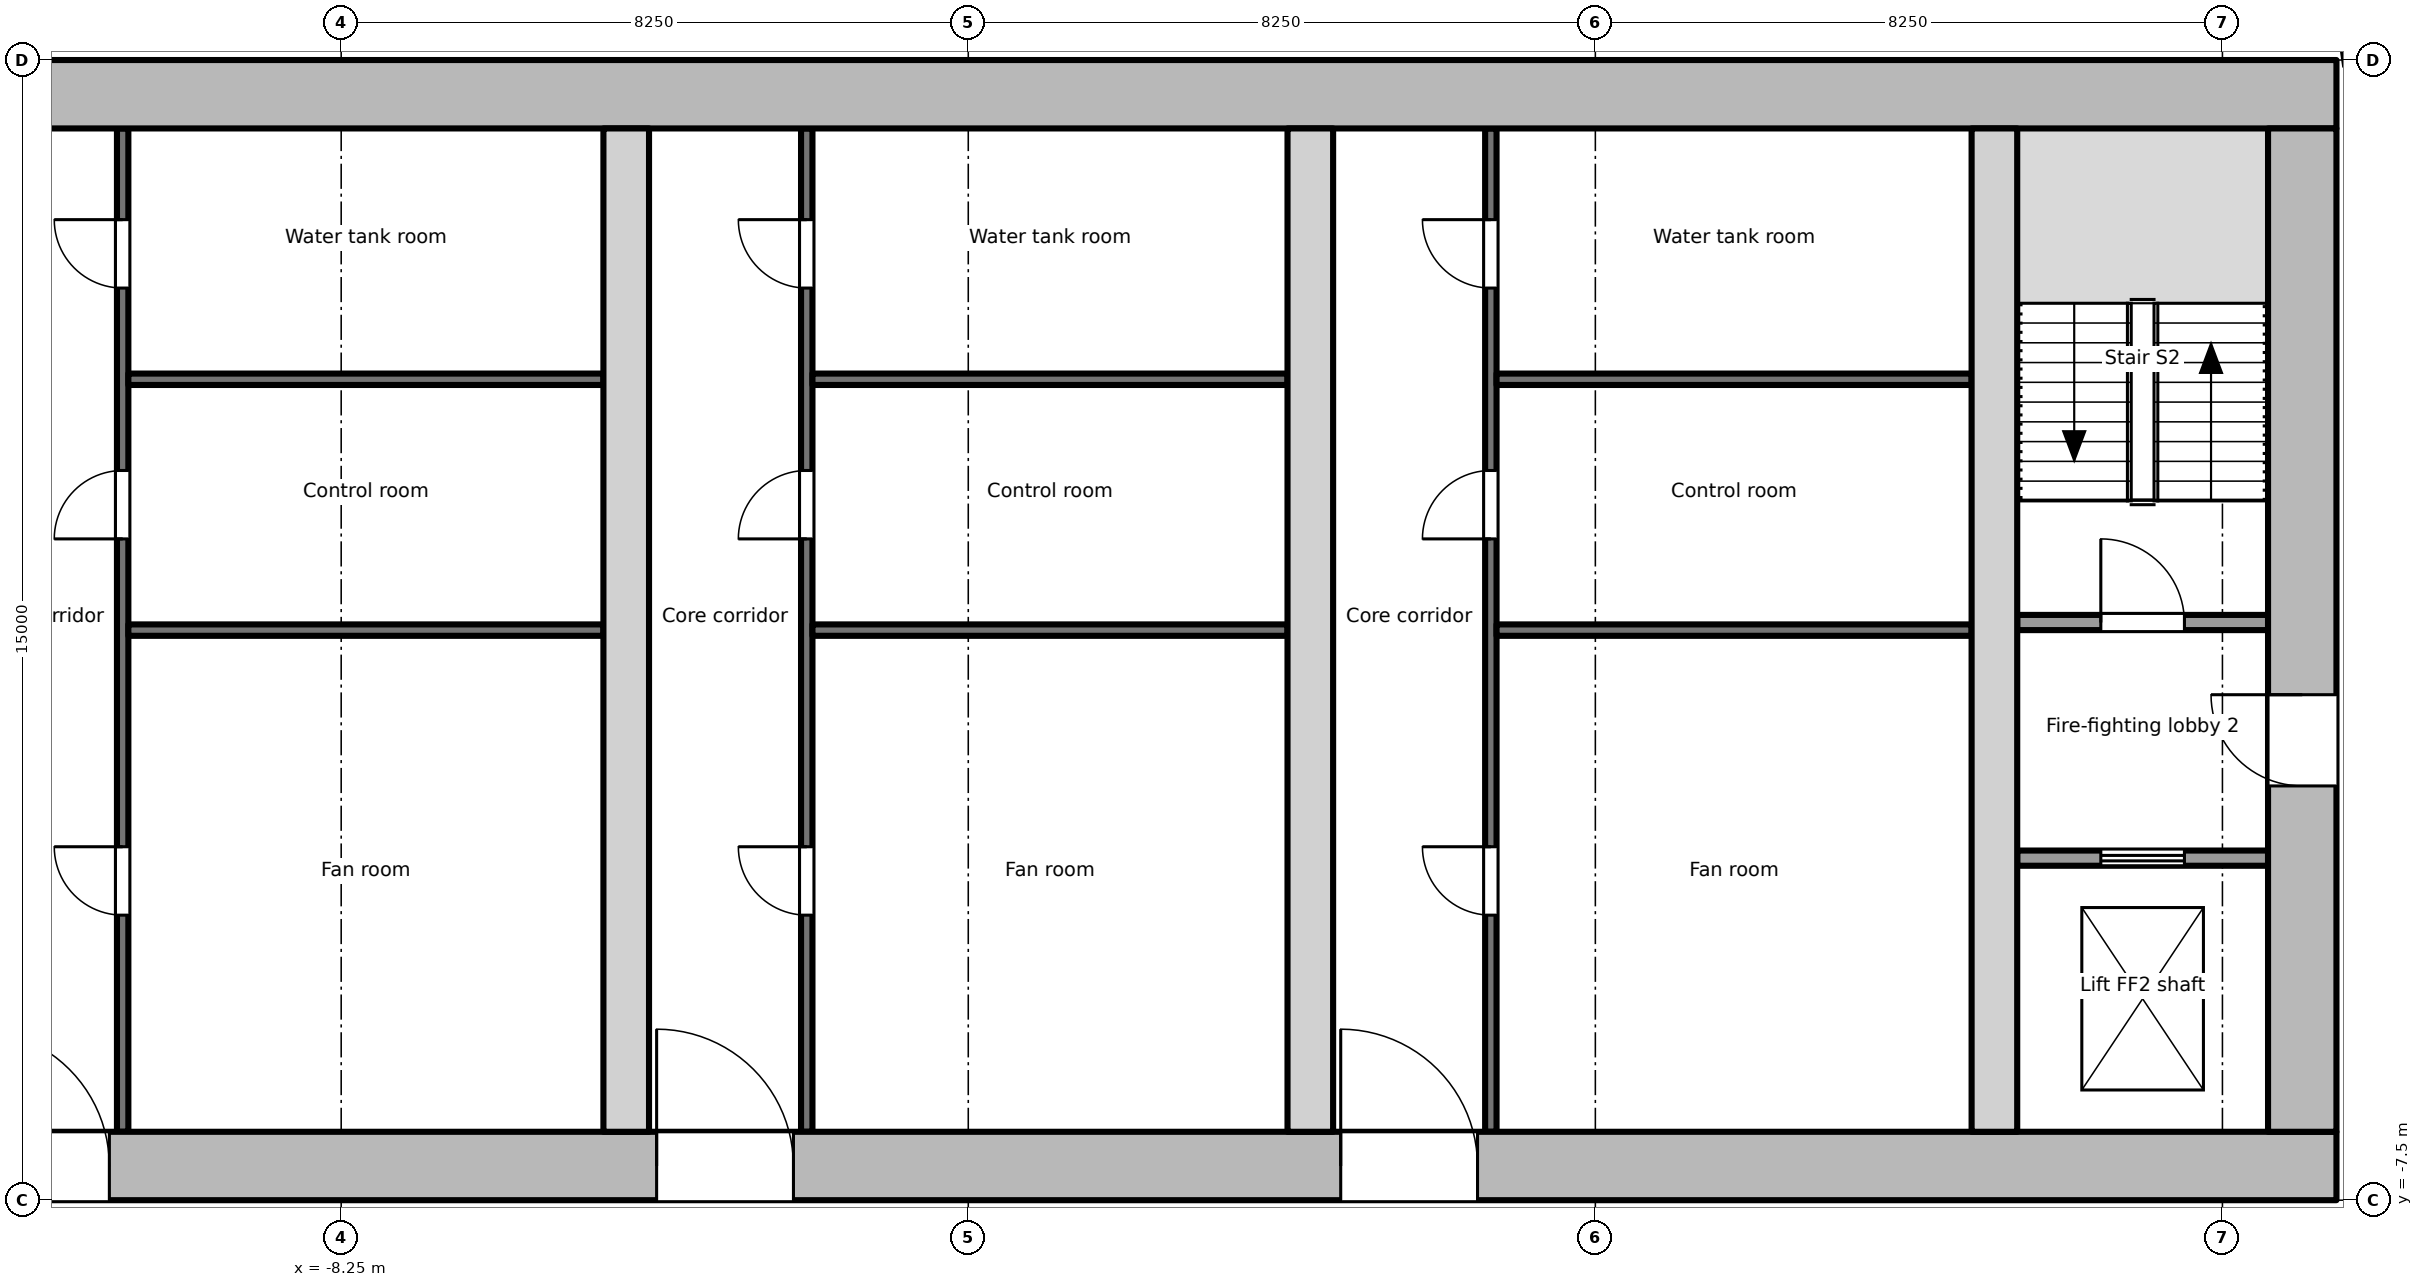
"""IFC4 building model, lengths in metres.
Left out: names, types, materials, properties, quantities, classifications, styles, units other than length and angle.
Written with IfcOpenShell. Run it as: python <this file> out.ifc"""

import sys

from ifc_helpers import new_model, si_unit, direction, frame, frame_2d, origin, place, context, subcontext, project, spatial, rectangle, extrude, element, fill, save


model = new_model("IFC4")
c1 = context("Model", 3, precision=1e-05, world=origin(), true_north=direction((0.0, 1.0)))
c2 = subcontext(c1, "Body", "Model", "MODEL_VIEW")
j1 = project(units=[si_unit("LENGTHUNIT", "METRE"), si_unit("PLANEANGLEUNIT", "RADIAN")], contexts=[c1])
p1 = place(None, origin())
s1 = spatial("IfcSite", under=j1, at=p1, CompositionType="ELEMENT")
p2 = place(p1, origin())
s2 = spatial("IfcBuilding", under=s1, at=p2, CompositionType="ELEMENT")
p3 = place(p2, frame((0.0, 0.0, 304.3)))
s3 = spatial("IfcBuildingStorey", under=s2, at=p3, CompositionType="ELEMENT", Elevation=304.3)
p4 = place(p3, frame((-18.0, -7.05, -0.2), z_axis=(0.0, 0.0, 1.0), x_axis=(1.0, 0.0, 0.0)))
e1 = element("IfcWall", 1, at=p4, inside=s3, PredefinedType="SHEAR", context=c2, shape_type="SweptSolid", body=[
    extrude(rectangle(XDim=36.0, YDim=0.9, at=frame_2d((18.0, 0.0))), origin(), (0.0, 0.0, 1.0), 4.0),
])
p5 = place(p4, frame((4.9, 0.0, 0.2)))
e2 = element("IfcOpeningElement", 2, at=p5, cuts=e1, PredefinedType="OPENING", context=c2, shape_type="SweptSolid", body=[
    extrude(rectangle(XDim=1.8, YDim=2.1, at=frame_2d((0.9, 1.05))), frame((0.0, 0.46, 0.0), z_axis=(0.0, -1.0, 0.0), x_axis=(1.0, 0.0, 0.0)), (0.0, 0.0, 1.0), 0.921),
])
p6 = place(p4, frame((13.9, 0.0, 0.2)))
e3 = element("IfcOpeningElement", 3, at=p6, cuts=e1, PredefinedType="OPENING", context=c2, shape_type="SweptSolid", body=[
    extrude(rectangle(XDim=1.8, YDim=2.1, at=frame_2d((0.9, 1.05))), frame((0.0, 0.46, 0.0), z_axis=(0.0, -1.0, 0.0), x_axis=(1.0, 0.0, 0.0)), (0.0, 0.0, 1.0), 0.921),
])
p7 = place(p4, frame((22.9, 0.0, 0.2)))
e4 = element("IfcOpeningElement", 4, at=p7, cuts=e1, PredefinedType="OPENING", context=c2, shape_type="SweptSolid", body=[
    extrude(rectangle(XDim=1.8, YDim=2.1, at=frame_2d((0.9, 1.05))), frame((0.0, 0.46, 0.0), z_axis=(0.0, -1.0, 0.0), x_axis=(1.0, 0.0, 0.0)), (0.0, 0.0, 1.0), 0.921),
])
p8 = place(p3, frame((-18.0, 7.05, -0.2), z_axis=(0.0, 0.0, 1.0), x_axis=(1.0, 0.0, 0.0)))
e5 = element("IfcWall", 5, at=p8, inside=s3, PredefinedType="SHEAR", context=c2, shape_type="SweptSolid", body=[
    extrude(rectangle(XDim=36.0, YDim=0.9, at=frame_2d((18.0, 0.0))), origin(), (0.0, 0.0, 1.0), 4.0),
])
p9 = place(p3, frame((17.55, -6.6, -0.2), z_axis=(0.0, 0.0, 1.0), x_axis=(0.0, 1.0, 0.0)))
e6 = element("IfcWall", 6, at=p9, inside=s3, PredefinedType="SHEAR", context=c2, shape_type="SweptSolid", body=[
    extrude(rectangle(XDim=13.2, YDim=0.9, at=frame_2d((6.6, 0.0))), origin(), (0.0, 0.0, 1.0), 4.0),
])
p10 = place(p9, frame((4.55, 0.0, 0.2)))
e7 = element("IfcOpeningElement", 7, at=p10, cuts=e6, PredefinedType="OPENING", context=c2, shape_type="SweptSolid", body=[
    extrude(rectangle(XDim=1.2, YDim=2.1, at=frame_2d((0.6, 1.05))), frame((0.0, 0.46, 0.0), z_axis=(0.0, -1.0, 0.0), x_axis=(1.0, 0.0, 0.0)), (0.0, 0.0, 1.0), 0.921),
])
for number, where, z_axis, x_axis in (
    (8, (-4.5, -6.6, -0.2), (0.0, 0.0, 1.0), (0.0, 1.0, 0.0)),
    (9, (4.5, -6.6, -0.2), (0.0, 0.0, 1.0), (0.0, 1.0, 0.0)),
    (10, (13.5, -6.6, -0.2), (0.0, 0.0, 1.0), (0.0, 1.0, 0.0)),
):
    element("IfcWall", number, at=place(p3, frame(where, z_axis=z_axis, x_axis=x_axis)), inside=s3, PredefinedType="SHEAR", context=c2, shape_type="SweptSolid", body=[
        extrude(rectangle(XDim=13.2, YDim=0.6, at=frame_2d((6.6, 0.0))), origin(), (0.0, 0.0, 1.0), 4.0),
    ])
p11 = place(p3, frame((13.8, -3.0, 0.0), z_axis=(0.0, 0.0, 1.0), x_axis=(1.0, 0.0, 0.0)))
e11 = element("IfcWall", 11, at=p11, inside=s3, PredefinedType="PARTITIONING", context=c2, shape_type="SweptSolid", body=[
    extrude(rectangle(XDim=3.3, YDim=0.2, at=frame_2d((1.65, 0.0))), origin(), (0.0, 0.0, 1.0), 3.8),
])
p12 = place(p11, frame((1.1, 0.0, 0.0)))
e12 = element("IfcOpeningElement", 12, at=p12, cuts=e11, PredefinedType="OPENING", context=c2, shape_type="SweptSolid", body=[
    extrude(rectangle(XDim=1.1, YDim=2.1, at=frame_2d((0.55, 1.05))), frame((0.0, 0.111, 0.0), z_axis=(0.0, -1.0, 0.0), x_axis=(1.0, 0.0, 0.0)), (0.0, 0.0, 1.0), 0.221),
])
p13 = place(p3, frame((13.8, 0.1, 0.0), z_axis=(0.0, 0.0, 1.0), x_axis=(1.0, 0.0, 0.0)))
e13 = element("IfcWall", 13, at=p13, inside=s3, PredefinedType="PARTITIONING", context=c2, shape_type="SweptSolid", body=[
    extrude(rectangle(XDim=3.3, YDim=0.2, at=frame_2d((1.65, 0.0))), origin(), (0.0, 0.0, 1.0), 3.8),
])
p14 = place(p13, frame((1.1, 0.0, 0.0)))
e14 = element("IfcOpeningElement", 14, at=p14, cuts=e13, PredefinedType="OPENING", context=c2, shape_type="SweptSolid", body=[
    extrude(rectangle(XDim=1.1, YDim=2.1, at=frame_2d((0.55, 1.05))), frame((0.0, 0.111, 0.0), z_axis=(0.0, -1.0, 0.0), x_axis=(1.0, 0.0, 0.0)), (0.0, 0.0, 1.0), 0.221),
])
p15 = place(p3, frame((-11.125, -6.6, 0.0), z_axis=(0.0, 0.0, 1.0), x_axis=(0.0, 1.0, 0.0)))
e15 = element("IfcWall", 15, at=p15, inside=s3, PredefinedType="PARTITIONING", context=c2, shape_type="SweptSolid", body=[
    extrude(rectangle(XDim=13.2, YDim=0.15, at=frame_2d((6.6, 0.0))), origin(), (0.0, 0.0, 1.0), 3.8),
])
p16 = place(p15, frame((2.85, 0.0, 0.0)))
e16 = element("IfcOpeningElement", 16, at=p16, cuts=e15, PredefinedType="OPENING", context=c2, shape_type="SweptSolid", body=[
    extrude(rectangle(XDim=0.9, YDim=2.1, at=frame_2d((0.45, 1.05))), frame((0.0, 0.085, 0.0), z_axis=(0.0, -1.0, 0.0), x_axis=(1.0, 0.0, 0.0)), (0.0, 0.0, 1.0), 0.171),
])
p17 = place(p15, frame((7.8, 0.0, 0.0)))
e17 = element("IfcOpeningElement", 17, at=p17, cuts=e15, PredefinedType="OPENING", context=c2, shape_type="SweptSolid", body=[
    extrude(rectangle(XDim=0.9, YDim=2.1, at=frame_2d((0.45, 1.05))), frame((0.0, 0.085, 0.0), z_axis=(0.0, -1.0, 0.0), x_axis=(1.0, 0.0, 0.0)), (0.0, 0.0, 1.0), 0.171),
])
p18 = place(p15, frame((11.1, 0.0, 0.0)))
e18 = element("IfcOpeningElement", 18, at=p18, cuts=e15, PredefinedType="OPENING", context=c2, shape_type="SweptSolid", body=[
    extrude(rectangle(XDim=0.9, YDim=2.1, at=frame_2d((0.45, 1.05))), frame((0.0, 0.085, 0.0), z_axis=(0.0, -1.0, 0.0), x_axis=(1.0, 0.0, 0.0)), (0.0, 0.0, 1.0), 0.171),
])
for number, where, z_axis, x_axis in (
    (19, (-11.05, 0.0, 0.0), (0.0, 0.0, 1.0), (1.0, 0.0, 0.0)),
    (20, (-11.05, 3.3, 0.0), (0.0, 0.0, 1.0), (1.0, 0.0, 0.0)),
):
    element("IfcWall", number, at=place(p3, frame(where, z_axis=z_axis, x_axis=x_axis)), inside=s3, PredefinedType="PARTITIONING", context=c2, shape_type="SweptSolid", body=[
        extrude(rectangle(XDim=6.25, YDim=0.15, at=frame_2d((3.125, 0.0))), origin(), (0.0, 0.0, 1.0), 3.8),
    ])
p19 = place(p3, frame((-2.125, -6.6, 0.0), z_axis=(0.0, 0.0, 1.0), x_axis=(0.0, 1.0, 0.0)))
e21 = element("IfcWall", 21, at=p19, inside=s3, PredefinedType="PARTITIONING", context=c2, shape_type="SweptSolid", body=[
    extrude(rectangle(XDim=13.2, YDim=0.15, at=frame_2d((6.6, 0.0))), origin(), (0.0, 0.0, 1.0), 3.8),
])
p20 = place(p19, frame((2.85, 0.0, 0.0)))
e22 = element("IfcOpeningElement", 22, at=p20, cuts=e21, PredefinedType="OPENING", context=c2, shape_type="SweptSolid", body=[
    extrude(rectangle(XDim=0.9, YDim=2.1, at=frame_2d((0.45, 1.05))), frame((0.0, 0.085, 0.0), z_axis=(0.0, -1.0, 0.0), x_axis=(1.0, 0.0, 0.0)), (0.0, 0.0, 1.0), 0.171),
])
p21 = place(p19, frame((7.8, 0.0, 0.0)))
e23 = element("IfcOpeningElement", 23, at=p21, cuts=e21, PredefinedType="OPENING", context=c2, shape_type="SweptSolid", body=[
    extrude(rectangle(XDim=0.9, YDim=2.1, at=frame_2d((0.45, 1.05))), frame((0.0, 0.085, 0.0), z_axis=(0.0, -1.0, 0.0), x_axis=(1.0, 0.0, 0.0)), (0.0, 0.0, 1.0), 0.171),
])
p22 = place(p19, frame((11.1, 0.0, 0.0)))
e24 = element("IfcOpeningElement", 24, at=p22, cuts=e21, PredefinedType="OPENING", context=c2, shape_type="SweptSolid", body=[
    extrude(rectangle(XDim=0.9, YDim=2.1, at=frame_2d((0.45, 1.05))), frame((0.0, 0.085, 0.0), z_axis=(0.0, -1.0, 0.0), x_axis=(1.0, 0.0, 0.0)), (0.0, 0.0, 1.0), 0.171),
])
for number, where, z_axis, x_axis in (
    (25, (-2.05, 0.0, 0.0), (0.0, 0.0, 1.0), (1.0, 0.0, 0.0)),
    (26, (-2.05, 3.3, 0.0), (0.0, 0.0, 1.0), (1.0, 0.0, 0.0)),
):
    element("IfcWall", number, at=place(p3, frame(where, z_axis=z_axis, x_axis=x_axis)), inside=s3, PredefinedType="PARTITIONING", context=c2, shape_type="SweptSolid", body=[
        extrude(rectangle(XDim=6.25, YDim=0.15, at=frame_2d((3.125, 0.0))), origin(), (0.0, 0.0, 1.0), 3.8),
    ])
p23 = place(p3, frame((6.875, -6.6, 0.0), z_axis=(0.0, 0.0, 1.0), x_axis=(0.0, 1.0, 0.0)))
e27 = element("IfcWall", 27, at=p23, inside=s3, PredefinedType="PARTITIONING", context=c2, shape_type="SweptSolid", body=[
    extrude(rectangle(XDim=13.2, YDim=0.15, at=frame_2d((6.6, 0.0))), origin(), (0.0, 0.0, 1.0), 3.8),
])
p24 = place(p23, frame((2.85, 0.0, 0.0)))
e28 = element("IfcOpeningElement", 28, at=p24, cuts=e27, PredefinedType="OPENING", context=c2, shape_type="SweptSolid", body=[
    extrude(rectangle(XDim=0.9, YDim=2.1, at=frame_2d((0.45, 1.05))), frame((0.0, 0.085, 0.0), z_axis=(0.0, -1.0, 0.0), x_axis=(1.0, 0.0, 0.0)), (0.0, 0.0, 1.0), 0.171),
])
p25 = place(p23, frame((7.8, 0.0, 0.0)))
e29 = element("IfcOpeningElement", 29, at=p25, cuts=e27, PredefinedType="OPENING", context=c2, shape_type="SweptSolid", body=[
    extrude(rectangle(XDim=0.9, YDim=2.1, at=frame_2d((0.45, 1.05))), frame((0.0, 0.085, 0.0), z_axis=(0.0, -1.0, 0.0), x_axis=(1.0, 0.0, 0.0)), (0.0, 0.0, 1.0), 0.171),
])
p26 = place(p23, frame((11.1, 0.0, 0.0)))
e30 = element("IfcOpeningElement", 30, at=p26, cuts=e27, PredefinedType="OPENING", context=c2, shape_type="SweptSolid", body=[
    extrude(rectangle(XDim=0.9, YDim=2.1, at=frame_2d((0.45, 1.05))), frame((0.0, 0.085, 0.0), z_axis=(0.0, -1.0, 0.0), x_axis=(1.0, 0.0, 0.0)), (0.0, 0.0, 1.0), 0.171),
])
for number, where, z_axis, x_axis in (
    (31, (6.95, 0.0, 0.0), (0.0, 0.0, 1.0), (1.0, 0.0, 0.0)),
    (32, (6.95, 3.3, 0.0), (0.0, 0.0, 1.0), (1.0, 0.0, 0.0)),
):
    element("IfcWall", number, at=place(p3, frame(where, z_axis=z_axis, x_axis=x_axis)), inside=s3, PredefinedType="PARTITIONING", context=c2, shape_type="SweptSolid", body=[
        extrude(rectangle(XDim=6.25, YDim=0.15, at=frame_2d((3.125, 0.0))), origin(), (0.0, 0.0, 1.0), 3.8),
    ])
p27 = place(p12, origin())
e33 = element("IfcDoor", 33, at=p27, inside=s3, OperationType="DOUBLE_DOOR_SLIDING", PredefinedType="DOOR", context=c2, shape_type="SweptSolid", body=[
    extrude(rectangle(XDim=1.1, YDim=2.1, at=frame_2d((0.55, 1.05))), frame((0.0, 0.025, 0.0), z_axis=(0.0, -1.0, 0.0), x_axis=(1.0, 0.0, 0.0)), (0.0, 0.0, 1.0), 0.05),
])
fill(e12, e33)
p28 = place(p10, origin())
e34 = element("IfcDoor", 34, at=p28, inside=s3, OperationType="SINGLE_SWING_RIGHT", PredefinedType="DOOR", context=c2, shape_type="SweptSolid", body=[
    extrude(rectangle(XDim=1.2, YDim=2.1, at=frame_2d((0.6, 1.05))), frame((0.0, 0.025, 0.0), z_axis=(0.0, -1.0, 0.0), x_axis=(1.0, 0.0, 0.0)), (0.0, 0.0, 1.0), 0.05),
])
fill(e7, e34)
p29 = place(p14, origin())
e35 = element("IfcDoor", 35, at=p29, inside=s3, OperationType="SINGLE_SWING_LEFT", PredefinedType="DOOR", context=c2, shape_type="SweptSolid", body=[
    extrude(rectangle(XDim=1.1, YDim=2.1, at=frame_2d((0.55, 1.05))), frame((0.0, 0.025, 0.0), z_axis=(0.0, -1.0, 0.0), x_axis=(1.0, 0.0, 0.0)), (0.0, 0.0, 1.0), 0.05),
])
fill(e14, e35)
p30 = place(p16, origin())
e36 = element("IfcDoor", 36, at=p30, inside=s3, OperationType="SINGLE_SWING_RIGHT", PredefinedType="DOOR", context=c2, shape_type="SweptSolid", body=[
    extrude(rectangle(XDim=0.9, YDim=2.1, at=frame_2d((0.45, 1.05))), frame((0.0, 0.025, 0.0), z_axis=(0.0, -1.0, 0.0), x_axis=(1.0, 0.0, 0.0)), (0.0, 0.0, 1.0), 0.05),
])
fill(e16, e36)
p31 = place(p17, origin())
e37 = element("IfcDoor", 37, at=p31, inside=s3, OperationType="SINGLE_SWING_LEFT", PredefinedType="DOOR", context=c2, shape_type="SweptSolid", body=[
    extrude(rectangle(XDim=0.9, YDim=2.1, at=frame_2d((0.45, 1.05))), frame((0.0, 0.025, 0.0), z_axis=(0.0, -1.0, 0.0), x_axis=(1.0, 0.0, 0.0)), (0.0, 0.0, 1.0), 0.05),
])
fill(e17, e37)
p32 = place(p18, origin())
e38 = element("IfcDoor", 38, at=p32, inside=s3, OperationType="SINGLE_SWING_RIGHT", PredefinedType="DOOR", context=c2, shape_type="SweptSolid", body=[
    extrude(rectangle(XDim=0.9, YDim=2.1, at=frame_2d((0.45, 1.05))), frame((0.0, 0.025, 0.0), z_axis=(0.0, -1.0, 0.0), x_axis=(1.0, 0.0, 0.0)), (0.0, 0.0, 1.0), 0.05),
])
fill(e18, e38)
p33 = place(p5, origin())
e39 = element("IfcDoor", 39, at=p33, inside=s3, OperationType="SINGLE_SWING_LEFT", PredefinedType="DOOR", context=c2, shape_type="SweptSolid", body=[
    extrude(rectangle(XDim=1.8, YDim=2.1, at=frame_2d((0.9, 1.05))), frame((0.0, 0.025, 0.0), z_axis=(0.0, -1.0, 0.0), x_axis=(1.0, 0.0, 0.0)), (0.0, 0.0, 1.0), 0.05),
])
fill(e2, e39)
p34 = place(p20, origin())
e40 = element("IfcDoor", 40, at=p34, inside=s3, OperationType="SINGLE_SWING_RIGHT", PredefinedType="DOOR", context=c2, shape_type="SweptSolid", body=[
    extrude(rectangle(XDim=0.9, YDim=2.1, at=frame_2d((0.45, 1.05))), frame((0.0, 0.025, 0.0), z_axis=(0.0, -1.0, 0.0), x_axis=(1.0, 0.0, 0.0)), (0.0, 0.0, 1.0), 0.05),
])
fill(e22, e40)
p35 = place(p21, origin())
e41 = element("IfcDoor", 41, at=p35, inside=s3, OperationType="SINGLE_SWING_LEFT", PredefinedType="DOOR", context=c2, shape_type="SweptSolid", body=[
    extrude(rectangle(XDim=0.9, YDim=2.1, at=frame_2d((0.45, 1.05))), frame((0.0, 0.025, 0.0), z_axis=(0.0, -1.0, 0.0), x_axis=(1.0, 0.0, 0.0)), (0.0, 0.0, 1.0), 0.05),
])
fill(e23, e41)
p36 = place(p22, origin())
e42 = element("IfcDoor", 42, at=p36, inside=s3, OperationType="SINGLE_SWING_RIGHT", PredefinedType="DOOR", context=c2, shape_type="SweptSolid", body=[
    extrude(rectangle(XDim=0.9, YDim=2.1, at=frame_2d((0.45, 1.05))), frame((0.0, 0.025, 0.0), z_axis=(0.0, -1.0, 0.0), x_axis=(1.0, 0.0, 0.0)), (0.0, 0.0, 1.0), 0.05),
])
fill(e24, e42)
p37 = place(p6, origin())
e43 = element("IfcDoor", 43, at=p37, inside=s3, OperationType="SINGLE_SWING_LEFT", PredefinedType="DOOR", context=c2, shape_type="SweptSolid", body=[
    extrude(rectangle(XDim=1.8, YDim=2.1, at=frame_2d((0.9, 1.05))), frame((0.0, 0.025, 0.0), z_axis=(0.0, -1.0, 0.0), x_axis=(1.0, 0.0, 0.0)), (0.0, 0.0, 1.0), 0.05),
])
fill(e3, e43)
p38 = place(p24, origin())
e44 = element("IfcDoor", 44, at=p38, inside=s3, OperationType="SINGLE_SWING_RIGHT", PredefinedType="DOOR", context=c2, shape_type="SweptSolid", body=[
    extrude(rectangle(XDim=0.9, YDim=2.1, at=frame_2d((0.45, 1.05))), frame((0.0, 0.025, 0.0), z_axis=(0.0, -1.0, 0.0), x_axis=(1.0, 0.0, 0.0)), (0.0, 0.0, 1.0), 0.05),
])
fill(e28, e44)
p39 = place(p25, origin())
e45 = element("IfcDoor", 45, at=p39, inside=s3, OperationType="SINGLE_SWING_LEFT", PredefinedType="DOOR", context=c2, shape_type="SweptSolid", body=[
    extrude(rectangle(XDim=0.9, YDim=2.1, at=frame_2d((0.45, 1.05))), frame((0.0, 0.025, 0.0), z_axis=(0.0, -1.0, 0.0), x_axis=(1.0, 0.0, 0.0)), (0.0, 0.0, 1.0), 0.05),
])
fill(e29, e45)
p40 = place(p26, origin())
e46 = element("IfcDoor", 46, at=p40, inside=s3, OperationType="SINGLE_SWING_RIGHT", PredefinedType="DOOR", context=c2, shape_type="SweptSolid", body=[
    extrude(rectangle(XDim=0.9, YDim=2.1, at=frame_2d((0.45, 1.05))), frame((0.0, 0.025, 0.0), z_axis=(0.0, -1.0, 0.0), x_axis=(1.0, 0.0, 0.0)), (0.0, 0.0, 1.0), 0.05),
])
fill(e30, e46)
p41 = place(p7, origin())
e47 = element("IfcDoor", 47, at=p41, inside=s3, OperationType="SINGLE_SWING_LEFT", PredefinedType="DOOR", context=c2, shape_type="SweptSolid", body=[
    extrude(rectangle(XDim=1.8, YDim=2.1, at=frame_2d((0.9, 1.05))), frame((0.0, 0.025, 0.0), z_axis=(0.0, -1.0, 0.0), x_axis=(1.0, 0.0, 0.0)), (0.0, 0.0, 1.0), 0.05),
])
fill(e4, e47)
save(model, sys.argv[1])
